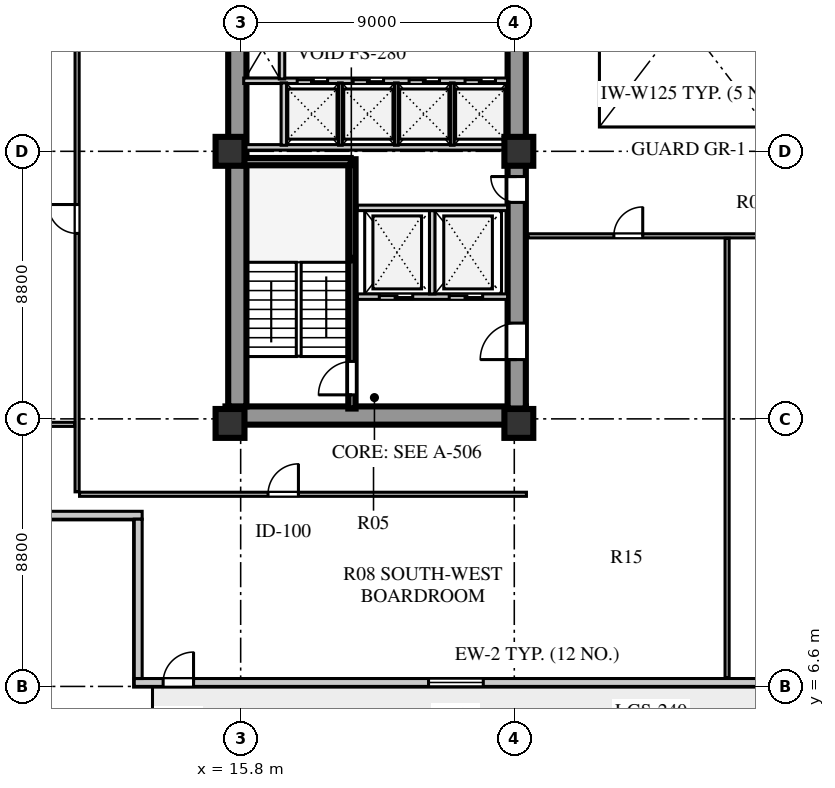
"""IFC4 building model, lengths in metres.
Left out: names, types, materials, properties, quantities, classifications, styles, units other than length and angle.
Written with IfcOpenShell. Run it as: python <this file> out.ifc"""

import sys

from ifc_helpers import new_model, si_unit, direction, frame, frame_2d, origin, origin_2d, place, context, subcontext, project, spatial, rectangle, extrude, element, fill, save


model = new_model("IFC4")
c1 = context("Model", 3, precision=1e-05, world=origin(), true_north=direction((0.0, 1.0)))
c2 = subcontext(c1, "Body", "Model", "MODEL_VIEW")
j1 = project(units=[si_unit("LENGTHUNIT", "METRE"), si_unit("PLANEANGLEUNIT", "RADIAN")], contexts=[c1])
p1 = place(None, origin())
s1 = spatial("IfcSite", under=j1, at=p1, CompositionType="ELEMENT")
p2 = place(p1, origin())
s2 = spatial("IfcBuilding", under=s1, at=p2, CompositionType="ELEMENT")
p3 = place(p2, frame((0.0, 0.0, 42.0)))
s3 = spatial("IfcBuildingStorey", under=s2, at=p3, CompositionType="ELEMENT", Elevation=42.0)
p4 = place(p3, frame((15.3, 15.51, 0.0), z_axis=(0.0, 0.0, 1.0), x_axis=(1.0, 0.0, 0.0)))
e1 = element("IfcWall", 1, at=p4, inside=s3, PredefinedType="SHEAR", context=c2, shape_type="SweptSolid", body=[
    extrude(rectangle(XDim=9.88, YDim=0.6, at=frame_2d((4.94, 0.0))), origin(), (0.0, 0.0, 1.0), 3.72),
])
p5 = place(p3, frame((15.69, 15.81, 0.0), z_axis=(0.0, 0.0, 1.0), x_axis=(0.0, 1.0, 0.0)))
e2 = element("IfcWall", 2, at=p5, inside=s3, PredefinedType="SHEAR", context=c2, shape_type="SweptSolid", body=[
    extrude(rectangle(XDim=25.63, YDim=0.6, at=frame_2d((12.815, 0.0))), origin(), (0.0, 0.0, 1.0), 3.72),
])
p6 = place(p3, frame((24.88, 15.74, 0.0), z_axis=(0.0, 0.0, 1.0), x_axis=(0.0, 1.0, 0.0)))
e3 = element("IfcWall", 3, at=p6, inside=s3, PredefinedType="SHEAR", context=c2, shape_type="SweptSolid", body=[
    extrude(rectangle(XDim=25.76, YDim=0.6, at=frame_2d((12.88, 0.0))), origin(), (0.0, 0.0, 1.0), 3.72),
])
p7 = place(p6, frame((1.61, 0.0, 0.0)))
e4 = element("IfcOpeningElement", 4, at=p7, cuts=e3, PredefinedType="OPENING", context=c2, shape_type="SweptSolid", body=[
    extrude(rectangle(XDim=1.2, YDim=2.1, at=frame_2d((0.6, 1.05))), frame((0.0, 0.31, 0.0), z_axis=(0.0, -1.0, 0.0), x_axis=(1.0, 0.0, 0.0)), (0.0, 0.0, 1.0), 0.62),
])
p8 = place(p6, frame((6.78, 0.0, 0.0)))
e5 = element("IfcOpeningElement", 5, at=p8, cuts=e3, PredefinedType="OPENING", context=c2, shape_type="SweptSolid", body=[
    extrude(rectangle(XDim=0.85, YDim=2.06, at=frame_2d((0.425, 1.03))), frame((0.0, 0.31, 0.0), z_axis=(0.0, -1.0, 0.0), x_axis=(1.0, 0.0, 0.0)), (0.0, 0.0, 1.0), 0.62),
])
p9 = place(p6, frame((12.11, 0.0, 0.0)))
e6 = element("IfcOpeningElement", 6, at=p9, cuts=e3, PredefinedType="OPENING", context=c2, shape_type="SweptSolid", body=[
    extrude(rectangle(XDim=1.5, YDim=2.12, at=frame_2d((0.75, 1.06))), frame((0.0, 0.31, 0.0), z_axis=(0.0, -1.0, 0.0), x_axis=(1.0, 0.0, 0.0)), (0.0, 0.0, 1.0), 0.62),
])
p10 = place(p6, frame((20.11, 0.0, 0.0)))
e7 = element("IfcOpeningElement", 7, at=p10, cuts=e3, PredefinedType="OPENING", context=c2, shape_type="SweptSolid", body=[
    extrude(rectangle(XDim=1.2, YDim=2.12, at=frame_2d((0.6, 1.06))), frame((0.0, 0.31, 0.0), z_axis=(0.0, -1.0, 0.0), x_axis=(1.0, 0.0, 0.0)), (0.0, 0.0, 1.0), 0.62),
])
p11 = place(p6, frame((24.01, 0.0, 0.0)))
e8 = element("IfcOpeningElement", 8, at=p11, cuts=e3, PredefinedType="OPENING", context=c2, shape_type="SweptSolid", body=[
    extrude(rectangle(XDim=0.95, YDim=2.1, at=frame_2d((0.475, 1.05))), frame((0.0, 0.31, 0.0), z_axis=(0.0, -1.0, 0.0), x_axis=(1.0, 0.0, 0.0)), (0.0, 0.0, 1.0), 0.62),
])
for number, where, z_axis, x_axis in (
    (9, (15.45, 15.25, 0.0), (0.0, 0.0, 1.0), (1.0, 0.0, 0.0)),
    (10, (15.45, 24.2, 0.0), (0.0, 0.0, 1.0), (1.0, 0.0, 0.0)),
    (11, (24.95, 15.25, 0.0), (0.0, 0.0, 1.0), (1.0, 0.0, 0.0)),
    (12, (24.95, 24.2, 0.0), (0.0, 0.0, 1.0), (1.0, 0.0, 0.0)),
):
    element("IfcColumn", number, at=place(p3, frame(where, z_axis=z_axis, x_axis=x_axis)), inside=s3, PredefinedType="COLUMN", context=c2, shape_type="SweptSolid", body=[
        extrude(rectangle(XDim=0.95, YDim=0.95, at=origin_2d()), origin(), (0.0, 0.0, 1.0), 3.72),
    ])
p12 = place(p3, frame((12.3, 6.73, 0.0), z_axis=(0.0, 0.0, 1.0), x_axis=(1.0, 0.0, 0.0)))
e13 = element("IfcWall", 13, at=p12, inside=s3, PredefinedType="SOLIDWALL", context=c2, shape_type="SweptSolid", body=[
    extrude(rectangle(XDim=34.0, YDim=0.26, at=frame_2d((17.0, 0.0))), origin(), (0.0, 0.0, 1.0), 3.72),
])
p13 = place(p12, frame((0.95, 0.0, 0.0)))
e14 = element("IfcOpeningElement", 14, at=p13, cuts=e13, PredefinedType="OPENING", context=c2, shape_type="SweptSolid", body=[
    extrude(rectangle(XDim=1.0, YDim=2.05, at=frame_2d((0.5, 1.025))), frame((0.0, 0.14, 0.0), z_axis=(0.0, -1.0, 0.0), x_axis=(1.0, 0.0, 0.0)), (0.0, 0.0, 1.0), 0.28),
])
p14 = place(p12, frame((9.68, 0.0, 0.8)))
e15 = element("IfcOpeningElement", 15, at=p14, cuts=e13, PredefinedType="OPENING", context=c2, shape_type="SweptSolid", body=[
    extrude(rectangle(XDim=1.8, YDim=2.0, at=frame_2d((0.9, 1.0))), frame((0.0, 0.14, 0.0), z_axis=(0.0, -1.0, 0.0), x_axis=(1.0, 0.0, 0.0)), (0.0, 0.0, 1.0), 0.28),
])
p15 = place(p12, frame((21.91, 0.0, 0.8)))
e16 = element("IfcOpeningElement", 16, at=p15, cuts=e13, PredefinedType="OPENING", context=c2, shape_type="SweptSolid", body=[
    extrude(rectangle(XDim=1.5, YDim=2.0, at=frame_2d((0.75, 1.0))), frame((0.0, 0.14, 0.0), z_axis=(0.0, -1.0, 0.0), x_axis=(1.0, 0.0, 0.0)), (0.0, 0.0, 1.0), 0.28),
])
p16 = place(p12, frame((29.255, 0.0, 0.8)))
e17 = element("IfcOpeningElement", 17, at=p16, cuts=e13, PredefinedType="OPENING", context=c2, shape_type="SweptSolid", body=[
    extrude(rectangle(XDim=1.2, YDim=1.75, at=frame_2d((0.6, 0.875))), frame((0.0, 0.14, 0.0), z_axis=(0.0, -1.0, 0.0), x_axis=(1.0, 0.0, 0.0)), (0.0, 0.0, 1.0), 0.28),
])
p17 = place(p3, frame((6.8, 12.23, 0.0), z_axis=(0.0, 0.0, 1.0), x_axis=(1.0, 0.0, 0.0)))
e18 = element("IfcWall", 18, at=p17, inside=s3, PredefinedType="SOLIDWALL", context=c2, shape_type="SweptSolid", body=[
    extrude(rectangle(XDim=5.76, YDim=0.26, at=frame_2d((2.88, 0.0))), origin(), (0.0, 0.0, 1.0), 3.72),
])
p18 = place(p3, frame((12.43, 12.1, 0.0), z_axis=(0.0, 0.0, 1.0), x_axis=(0.0, -1.0, 0.0)))
e19 = element("IfcWall", 19, at=p18, inside=s3, PredefinedType="SOLIDWALL", context=c2, shape_type="SweptSolid", body=[
    extrude(rectangle(XDim=5.24, YDim=0.26, at=frame_2d((2.62, 0.0))), origin(), (0.0, 0.0, 1.0), 3.72),
])
p19 = place(p3, frame((19.46, 15.74, 0.0), z_axis=(0.0, 0.0, 1.0), x_axis=(0.0, 1.0, 0.0)))
e20 = element("IfcWall", 20, at=p19, inside=s3, PredefinedType="SHEAR", context=c2, shape_type="SweptSolid", body=[
    extrude(rectangle(XDim=8.2, YDim=0.24, at=frame_2d((4.1, 0.0))), origin(), (0.0, 0.0, 1.0), 4.0),
])
p20 = place(p19, frame((0.45, 0.0, 0.0)))
e21 = element("IfcOpeningElement", 21, at=p20, cuts=e20, PredefinedType="OPENING", context=c2, shape_type="SweptSolid", body=[
    extrude(rectangle(XDim=1.1, YDim=2.1, at=frame_2d((0.55, 1.05))), frame((0.0, 0.13, 0.0), z_axis=(0.0, -1.0, 0.0), x_axis=(1.0, 0.0, 0.0)), (0.0, 0.0, 1.0), 0.26),
])
p21 = place(p3, frame((15.9, 23.86, 0.0), z_axis=(0.0, 0.0, 1.0), x_axis=(1.0, 0.0, 0.0)))
e22 = element("IfcWall", 22, at=p21, inside=s3, PredefinedType="SHEAR", context=c2, shape_type="SweptSolid", body=[
    extrude(rectangle(XDim=3.52, YDim=0.24, at=frame_2d((1.76, 0.0))), origin(), (0.0, 0.0, 1.0), 4.0),
])
p22 = place(p3, frame((19.64, 19.42, 0.0), z_axis=(0.0, 0.0, 1.0), x_axis=(1.0, 0.0, 0.0)))
e23 = element("IfcWall", 23, at=p22, inside=s3, PredefinedType="SOLIDWALL", context=c2, shape_type="SweptSolid", body=[
    extrude(rectangle(XDim=4.94, YDim=0.18, at=frame_2d((2.47, 0.0))), origin(), (0.0, 0.0, 1.0), 3.72),
])
p23 = place(p22, frame((0.72, 0.0, 0.0)))
e24 = element("IfcOpeningElement", 24, at=p23, cuts=e23, PredefinedType="OPENING", context=c2, shape_type="SweptSolid", body=[
    extrude(rectangle(XDim=1.1, YDim=2.1, at=frame_2d((0.55, 1.05))), frame((0.0, 0.1, 0.0), z_axis=(0.0, -1.0, 0.0), x_axis=(1.0, 0.0, 0.0)), (0.0, 0.0, 1.0), 0.2),
])
p24 = place(p22, frame((3.02, 0.0, 0.0)))
e25 = element("IfcOpeningElement", 25, at=p24, cuts=e23, PredefinedType="OPENING", context=c2, shape_type="SweptSolid", body=[
    extrude(rectangle(XDim=1.1, YDim=2.1, at=frame_2d((0.55, 1.05))), frame((0.0, 0.1, 0.0), z_axis=(0.0, -1.0, 0.0), x_axis=(1.0, 0.0, 0.0)), (0.0, 0.0, 1.0), 0.2),
])
p25 = place(p3, frame((22.1, 19.51, 0.0), z_axis=(0.0, 0.0, 1.0), x_axis=(0.0, 1.0, 0.0)))
e26 = element("IfcWall", 26, at=p25, inside=s3, PredefinedType="SOLIDWALL", context=c2, shape_type="SweptSolid", body=[
    extrude(rectangle(XDim=2.74, YDim=0.18, at=frame_2d((1.37, 0.0))), origin(), (0.0, 0.0, 1.0), 3.72),
])
p26 = place(p3, frame((19.64, 22.34, 0.0), z_axis=(0.0, 0.0, 1.0), x_axis=(1.0, 0.0, 0.0)))
e27 = element("IfcWall", 27, at=p26, inside=s3, PredefinedType="SOLIDWALL", context=c2, shape_type="SweptSolid", body=[
    extrude(rectangle(XDim=4.94, YDim=0.18, at=frame_2d((2.47, 0.0))), origin(), (0.0, 0.0, 1.0), 3.72),
])
p27 = place(p3, frame((15.9, 26.52, 0.0), z_axis=(0.0, 0.0, 1.0), x_axis=(1.0, 0.0, 0.0)))
e28 = element("IfcWall", 28, at=p27, inside=s3, PredefinedType="SOLIDWALL", context=c2, shape_type="SweptSolid", body=[
    extrude(rectangle(XDim=8.68, YDim=0.18, at=frame_2d((4.34, 0.0))), origin(), (0.0, 0.0, 1.0), 3.72),
])
p28 = place(p27, frame((1.76, 0.0, 0.0)))
e29 = element("IfcOpeningElement", 29, at=p28, cuts=e28, PredefinedType="OPENING", context=c2, shape_type="SweptSolid", body=[
    extrude(rectangle(XDim=1.0, YDim=2.1, at=frame_2d((0.5, 1.05))), frame((0.0, 0.1, 0.0), z_axis=(0.0, -1.0, 0.0), x_axis=(1.0, 0.0, 0.0)), (0.0, 0.0, 1.0), 0.2),
])
p29 = place(p27, frame((3.6, 0.0, 0.0)))
e30 = element("IfcOpeningElement", 30, at=p29, cuts=e28, PredefinedType="OPENING", context=c2, shape_type="SweptSolid", body=[
    extrude(rectangle(XDim=1.0, YDim=2.1, at=frame_2d((0.5, 1.05))), frame((0.0, 0.1, 0.0), z_axis=(0.0, -1.0, 0.0), x_axis=(1.0, 0.0, 0.0)), (0.0, 0.0, 1.0), 0.2),
])
p30 = place(p27, frame((5.44, 0.0, 0.0)))
e31 = element("IfcOpeningElement", 31, at=p30, cuts=e28, PredefinedType="OPENING", context=c2, shape_type="SweptSolid", body=[
    extrude(rectangle(XDim=1.0, YDim=2.1, at=frame_2d((0.5, 1.05))), frame((0.0, 0.1, 0.0), z_axis=(0.0, -1.0, 0.0), x_axis=(1.0, 0.0, 0.0)), (0.0, 0.0, 1.0), 0.2),
])
p31 = place(p27, frame((7.28, 0.0, 0.0)))
e32 = element("IfcOpeningElement", 32, at=p31, cuts=e28, PredefinedType="OPENING", context=c2, shape_type="SweptSolid", body=[
    extrude(rectangle(XDim=1.0, YDim=2.1, at=frame_2d((0.5, 1.05))), frame((0.0, 0.1, 0.0), z_axis=(0.0, -1.0, 0.0), x_axis=(1.0, 0.0, 0.0)), (0.0, 0.0, 1.0), 0.2),
])
p32 = place(p3, frame((15.9, 24.33, 0.0), z_axis=(0.0, 0.0, 1.0), x_axis=(1.0, 0.0, 0.0)))
e33 = element("IfcWall", 33, at=p32, inside=s3, PredefinedType="SOLIDWALL", context=c2, shape_type="SweptSolid", body=[
    extrude(rectangle(XDim=8.68, YDim=0.18, at=frame_2d((4.34, 0.0))), origin(), (0.0, 0.0, 1.0), 3.02),
])
p33 = place(p3, frame((17.22, 24.4, 0.0), z_axis=(0.0, 0.0, 1.0), x_axis=(0.0, 1.0, 0.0)))
e34 = element("IfcWall", 34, at=p33, inside=s3, PredefinedType="SOLIDWALL", context=c2, shape_type="SweptSolid", body=[
    extrude(rectangle(XDim=2.05, YDim=0.18, at=frame_2d((1.025, 0.0))), origin(), (0.0, 0.0, 1.0), 3.72),
])
for number, where, z_axis, x_axis in (
    (35, (19.08, 24.4, 0.0), (0.0, 0.0, 1.0), (0.0, 1.0, 0.0)),
    (36, (20.92, 24.4, 0.0), (0.0, 0.0, 1.0), (0.0, 1.0, 0.0)),
    (37, (22.76, 24.4, 0.0), (0.0, 0.0, 1.0), (0.0, 1.0, 0.0)),
):
    element("IfcWall", number, at=place(p3, frame(where, z_axis=z_axis, x_axis=x_axis)), inside=s3, PredefinedType="PARTITIONING", context=c2, shape_type="SweptSolid", body=[
        extrude(rectangle(XDim=2.05, YDim=0.12, at=frame_2d((1.025, 0.0))), origin(), (0.0, 0.0, 1.0), 3.72),
    ])
p34 = place(p3, frame((17.16, 26.58, 0.0), z_axis=(0.0, 0.0, 1.0), x_axis=(0.0, 1.0, 0.0)))
e38 = element("IfcWall", 38, at=p34, inside=s3, PredefinedType="SOLIDWALL", context=c2, shape_type="SweptSolid", body=[
    extrude(rectangle(XDim=4.02, YDim=0.18, at=frame_2d((2.01, 0.0))), origin(), (0.0, 0.0, 1.0), 3.72),
])
p35 = place(p34, frame((2.35, 0.0, 0.0)))
e39 = element("IfcOpeningElement", 39, at=p35, cuts=e38, PredefinedType="OPENING", context=c2, shape_type="SweptSolid", body=[
    extrude(rectangle(XDim=0.85, YDim=2.06, at=frame_2d((0.425, 1.03))), frame((0.0, 0.1, 0.0), z_axis=(0.0, -1.0, 0.0), x_axis=(1.0, 0.0, 0.0)), (0.0, 0.0, 1.0), 0.2),
])
p36 = place(p3, frame((25.25, 21.42, 0.0), z_axis=(0.0, 0.0, 1.0), x_axis=(1.0, 0.0, 0.0)))
e40 = element("IfcWall", 40, at=p36, inside=s3, PredefinedType="PARTITIONING", context=c2, shape_type="SweptSolid", body=[
    extrude(rectangle(XDim=12.87, YDim=0.135, at=frame_2d((6.435, 0.0))), origin(), (0.0, 0.0, 1.0), 3.32),
])
p37 = place(p36, frame((2.825, 0.0, 0.0)))
e41 = element("IfcOpeningElement", 41, at=p37, cuts=e40, PredefinedType="OPENING", context=c2, shape_type="SweptSolid", body=[
    extrude(rectangle(XDim=0.95, YDim=2.08, at=frame_2d((0.475, 1.04))), frame((0.0, 0.078, 0.0), z_axis=(0.0, -1.0, 0.0), x_axis=(1.0, 0.0, 0.0)), (0.0, 0.0, 1.0), 0.155),
])
p38 = place(p36, frame((9.195, 0.0, 0.0)))
e42 = element("IfcOpeningElement", 42, at=p38, cuts=e40, PredefinedType="OPENING", context=c2, shape_type="SweptSolid", body=[
    extrude(rectangle(XDim=0.95, YDim=2.08, at=frame_2d((0.475, 1.04))), frame((0.0, 0.078, 0.0), z_axis=(0.0, -1.0, 0.0), x_axis=(1.0, 0.0, 0.0)), (0.0, 0.0, 1.0), 0.155),
])
p39 = place(p3, frame((10.42, 13.0, 0.0), z_axis=(0.0, 0.0, 1.0), x_axis=(0.0, 1.0, 0.0)))
e43 = element("IfcWall", 43, at=p39, inside=s3, PredefinedType="PARTITIONING", context=c2, shape_type="SweptSolid", body=[
    extrude(rectangle(XDim=31.2, YDim=0.135, at=frame_2d((15.6, 0.0))), origin(), (0.0, 0.0, 1.0), 3.72),
])
p40 = place(p39, frame((8.5, 0.0, 0.0)))
e44 = element("IfcOpeningElement", 44, at=p40, cuts=e43, PredefinedType="OPENING", context=c2, shape_type="SweptSolid", body=[
    extrude(rectangle(XDim=0.95, YDim=2.08, at=frame_2d((0.475, 1.04))), frame((0.0, 0.078, 0.0), z_axis=(0.0, -1.0, 0.0), x_axis=(1.0, 0.0, 0.0)), (0.0, 0.0, 1.0), 0.155),
])
p41 = place(p39, frame((21.8, 0.0, 0.0)))
e45 = element("IfcOpeningElement", 45, at=p41, cuts=e43, PredefinedType="OPENING", context=c2, shape_type="SweptSolid", body=[
    extrude(rectangle(XDim=0.95, YDim=2.08, at=frame_2d((0.475, 1.04))), frame((0.0, 0.078, 0.0), z_axis=(0.0, -1.0, 0.0), x_axis=(1.0, 0.0, 0.0)), (0.0, 0.0, 1.0), 0.155),
])
p42 = place(p3, frame((7.08, 15.22, 0.0), z_axis=(0.0, 0.0, 1.0), x_axis=(1.0, 0.0, 0.0)))
e46 = element("IfcWall", 46, at=p42, inside=s3, PredefinedType="PARTITIONING", context=c2, shape_type="SweptSolid", body=[
    extrude(rectangle(XDim=3.26, YDim=0.135, at=frame_2d((1.63, 0.0))), origin(), (0.0, 0.0, 1.0), 3.22),
])
p43 = place(p3, frame((10.5, 12.92, 0.0), z_axis=(0.0, 0.0, 1.0), x_axis=(1.0, 0.0, 0.0)))
e47 = element("IfcWall", 47, at=p43, inside=s3, PredefinedType="PARTITIONING", context=c2, shape_type="SweptSolid", body=[
    extrude(rectangle(XDim=14.7, YDim=0.135, at=frame_2d((7.35, 0.0))), origin(), (0.0, 0.0, 1.0), 3.72),
])
p44 = place(p43, frame((6.2, 0.0, 0.0)))
e48 = element("IfcOpeningElement", 48, at=p44, cuts=e47, PredefinedType="OPENING", context=c2, shape_type="SweptSolid", body=[
    extrude(rectangle(XDim=1.0, YDim=2.08, at=frame_2d((0.5, 1.04))), frame((0.0, 0.078, 0.0), z_axis=(0.0, -1.0, 0.0), x_axis=(1.0, 0.0, 0.0)), (0.0, 0.0, 1.0), 0.155),
])
p45 = place(p3, frame((31.8, 6.88, 0.0), z_axis=(0.0, 0.0, 1.0), x_axis=(0.0, 1.0, 0.0)))
e49 = element("IfcWall", 49, at=p45, inside=s3, PredefinedType="PARTITIONING", context=c2, shape_type="SweptSolid", body=[
    extrude(rectangle(XDim=14.46, YDim=0.135, at=frame_2d((7.23, 0.0))), origin(), (0.0, 0.0, 1.0), 3.72),
])
p46 = place(p13, frame((1.0, 0.0, 0.0), z_axis=(0.0, 0.0, 1.0), x_axis=(-1.0, 0.0, 0.0)))
e50 = element("IfcDoor", 50, at=p46, inside=s3, OperationType="SINGLE_SWING_LEFT", PredefinedType="DOOR", context=c2, shape_type="SweptSolid", body=[
    extrude(rectangle(XDim=1.0, YDim=2.05, at=frame_2d((0.5, 1.025))), frame((0.0, 0.025, 0.0), z_axis=(0.0, -1.0, 0.0), x_axis=(1.0, 0.0, 0.0)), (0.0, 0.0, 1.0), 0.05),
])
fill(e14, e50)
p47 = place(p14, origin())
e51 = element("IfcWindow", 51, at=p47, inside=s3, PartitioningType="SINGLE_PANEL", PredefinedType="WINDOW", context=c2, shape_type="SweptSolid", body=[
    extrude(rectangle(XDim=1.8, YDim=2.0, at=frame_2d((0.9, 1.0))), frame((0.0, 0.03, 0.0), z_axis=(0.0, -1.0, 0.0), x_axis=(1.0, 0.0, 0.0)), (0.0, 0.0, 1.0), 0.06),
])
fill(e15, e51)
p48 = place(p20, origin())
e52 = element("IfcDoor", 52, at=p48, inside=s3, OperationType="SINGLE_SWING_LEFT", PredefinedType="DOOR", context=c2, shape_type="SweptSolid", body=[
    extrude(rectangle(XDim=1.1, YDim=2.1, at=frame_2d((0.55, 1.05))), frame((0.0, 0.025, 0.0), z_axis=(0.0, -1.0, 0.0), x_axis=(1.0, 0.0, 0.0)), (0.0, 0.0, 1.0), 0.05),
])
fill(e21, e52)
p49 = place(p23, origin())
e53 = element("IfcDoor", 53, at=p49, inside=s3, OperationType="DOUBLE_DOOR_SLIDING", PredefinedType="DOOR", context=c2, shape_type="SweptSolid", body=[
    extrude(rectangle(XDim=1.1, YDim=2.1, at=frame_2d((0.55, 1.05))), frame((0.0, 0.025, 0.0), z_axis=(0.0, -1.0, 0.0), x_axis=(1.0, 0.0, 0.0)), (0.0, 0.0, 1.0), 0.05),
])
fill(e24, e53)
p50 = place(p24, origin())
e54 = element("IfcDoor", 54, at=p50, inside=s3, OperationType="DOUBLE_DOOR_SLIDING", PredefinedType="DOOR", context=c2, shape_type="SweptSolid", body=[
    extrude(rectangle(XDim=1.1, YDim=2.1, at=frame_2d((0.55, 1.05))), frame((0.0, 0.025, 0.0), z_axis=(0.0, -1.0, 0.0), x_axis=(1.0, 0.0, 0.0)), (0.0, 0.0, 1.0), 0.05),
])
fill(e25, e54)
p51 = place(p7, frame((1.2, 0.0, 0.0), z_axis=(0.0, 0.0, 1.0), x_axis=(-1.0, 0.0, 0.0)))
e55 = element("IfcDoor", 55, at=p51, inside=s3, OperationType="SINGLE_SWING_RIGHT", PredefinedType="DOOR", context=c2, shape_type="SweptSolid", body=[
    extrude(rectangle(XDim=1.2, YDim=2.1, at=frame_2d((0.6, 1.05))), frame((0.0, 0.025, 0.0), z_axis=(0.0, -1.0, 0.0), x_axis=(1.0, 0.0, 0.0)), (0.0, 0.0, 1.0), 0.05),
])
fill(e4, e55)
p52 = place(p8, frame((0.85, 0.0, 0.0), z_axis=(0.0, 0.0, 1.0), x_axis=(-1.0, 0.0, 0.0)))
e56 = element("IfcDoor", 56, at=p52, inside=s3, OperationType="SINGLE_SWING_LEFT", PredefinedType="DOOR", context=c2, shape_type="SweptSolid", body=[
    extrude(rectangle(XDim=0.85, YDim=2.06, at=frame_2d((0.425, 1.03))), frame((0.0, 0.025, 0.0), z_axis=(0.0, -1.0, 0.0), x_axis=(1.0, 0.0, 0.0)), (0.0, 0.0, 1.0), 0.05),
])
fill(e5, e56)
p53 = place(p28, origin())
e57 = element("IfcDoor", 57, at=p53, inside=s3, OperationType="DOUBLE_DOOR_SLIDING", PredefinedType="DOOR", context=c2, shape_type="SweptSolid", body=[
    extrude(rectangle(XDim=1.0, YDim=2.1, at=frame_2d((0.5, 1.05))), frame((0.0, 0.025, 0.0), z_axis=(0.0, -1.0, 0.0), x_axis=(1.0, 0.0, 0.0)), (0.0, 0.0, 1.0), 0.05),
])
fill(e29, e57)
p54 = place(p29, origin())
e58 = element("IfcDoor", 58, at=p54, inside=s3, OperationType="DOUBLE_DOOR_SLIDING", PredefinedType="DOOR", context=c2, shape_type="SweptSolid", body=[
    extrude(rectangle(XDim=1.0, YDim=2.1, at=frame_2d((0.5, 1.05))), frame((0.0, 0.025, 0.0), z_axis=(0.0, -1.0, 0.0), x_axis=(1.0, 0.0, 0.0)), (0.0, 0.0, 1.0), 0.05),
])
fill(e30, e58)
p55 = place(p30, origin())
e59 = element("IfcDoor", 59, at=p55, inside=s3, OperationType="DOUBLE_DOOR_SLIDING", PredefinedType="DOOR", context=c2, shape_type="SweptSolid", body=[
    extrude(rectangle(XDim=1.0, YDim=2.1, at=frame_2d((0.5, 1.05))), frame((0.0, 0.025, 0.0), z_axis=(0.0, -1.0, 0.0), x_axis=(1.0, 0.0, 0.0)), (0.0, 0.0, 1.0), 0.05),
])
fill(e31, e59)
p56 = place(p31, origin())
e60 = element("IfcDoor", 60, at=p56, inside=s3, OperationType="DOUBLE_DOOR_SLIDING", PredefinedType="DOOR", context=c2, shape_type="SweptSolid", body=[
    extrude(rectangle(XDim=1.0, YDim=2.1, at=frame_2d((0.5, 1.05))), frame((0.0, 0.025, 0.0), z_axis=(0.0, -1.0, 0.0), x_axis=(1.0, 0.0, 0.0)), (0.0, 0.0, 1.0), 0.05),
])
fill(e32, e60)
p57 = place(p44, frame((1.0, 0.0, 0.0), z_axis=(0.0, 0.0, 1.0), x_axis=(-1.0, 0.0, 0.0)))
e61 = element("IfcDoor", 61, at=p57, inside=s3, OperationType="SINGLE_SWING_LEFT", PredefinedType="DOOR", context=c2, shape_type="SweptSolid", body=[
    extrude(rectangle(XDim=1.0, YDim=2.08, at=frame_2d((0.5, 1.04))), frame((0.0, 0.025, 0.0), z_axis=(0.0, -1.0, 0.0), x_axis=(1.0, 0.0, 0.0)), (0.0, 0.0, 1.0), 0.05),
])
fill(e48, e61)
p58 = place(p40, frame((0.95, 0.0, 0.0), z_axis=(0.0, 0.0, 1.0), x_axis=(-1.0, 0.0, 0.0)))
e62 = element("IfcDoor", 62, at=p58, inside=s3, OperationType="SINGLE_SWING_LEFT", PredefinedType="DOOR", context=c2, shape_type="SweptSolid", body=[
    extrude(rectangle(XDim=0.95, YDim=2.08, at=frame_2d((0.475, 1.04))), frame((0.0, 0.025, 0.0), z_axis=(0.0, -1.0, 0.0), x_axis=(1.0, 0.0, 0.0)), (0.0, 0.0, 1.0), 0.05),
])
fill(e44, e62)
p59 = place(p37, frame((0.95, 0.0, 0.0), z_axis=(0.0, 0.0, 1.0), x_axis=(-1.0, 0.0, 0.0)))
e63 = element("IfcDoor", 63, at=p59, inside=s3, OperationType="SINGLE_SWING_LEFT", PredefinedType="DOOR", context=c2, shape_type="SweptSolid", body=[
    extrude(rectangle(XDim=0.95, YDim=2.08, at=frame_2d((0.475, 1.04))), frame((0.0, 0.025, 0.0), z_axis=(0.0, -1.0, 0.0), x_axis=(1.0, 0.0, 0.0)), (0.0, 0.0, 1.0), 0.05),
])
fill(e41, e63)
save(model, sys.argv[1])
